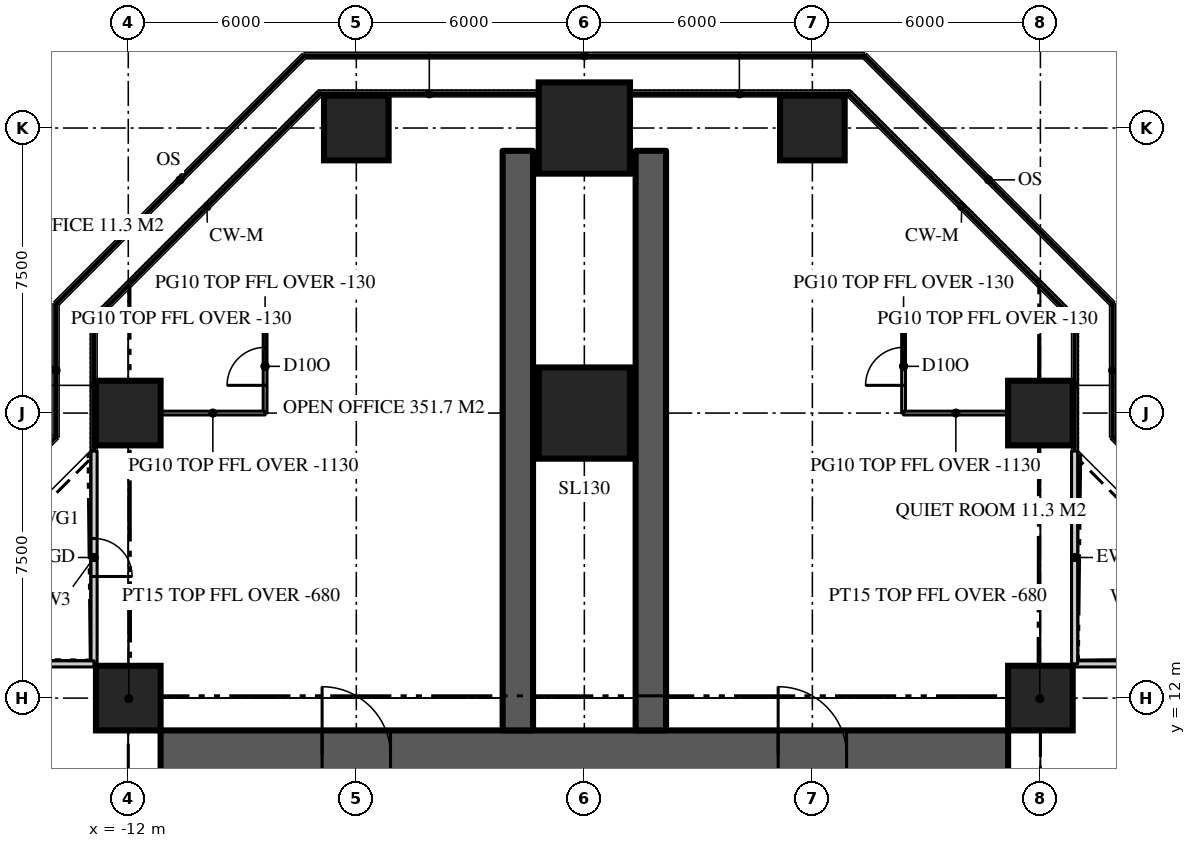
"""IFC4 building model, lengths in metres.
Left out: names, types, materials, properties, quantities, classifications, styles, units other than length and angle.
Written with IfcOpenShell. Run it as: python <this file> out.ifc"""

import sys

from ifc_helpers import new_model, si_unit, direction, frame, frame_2d, origin, origin_2d, place, context, subcontext, project, spatial, rectangle, extrude, element, fill, save


model = new_model("IFC4")
c1 = context("Model", 3, precision=1e-05, world=origin(), true_north=direction((0.0, 1.0)))
c2 = subcontext(c1, "Body", "Model", "MODEL_VIEW")
j1 = project(units=[si_unit("LENGTHUNIT", "METRE"), si_unit("PLANEANGLEUNIT", "RADIAN")], contexts=[c1])
p1 = place(None, origin())
s1 = spatial("IfcSite", under=j1, at=p1, CompositionType="ELEMENT")
p2 = place(p1, origin())
s2 = spatial("IfcBuilding", under=s1, at=p2, CompositionType="ELEMENT")
p3 = place(p2, frame((0.0, 0.0, 174.9)))
s3 = spatial("IfcBuildingStorey", under=s2, at=p3, CompositionType="ELEMENT", Elevation=174.9)
p4 = place(p3, frame((-11.15, 10.5, 0.0), z_axis=(0.0, 0.0, 1.0), x_axis=(1.0, 0.0, 0.0)))
e1 = element("IfcWall", 1, at=p4, inside=s3, PredefinedType="SHEAR", context=c2, shape_type="SweptSolid", body=[
    extrude(rectangle(XDim=22.3, YDim=1.3, at=frame_2d((11.15, 0.0))), origin(), (0.0, 0.0, 1.0), 3.9),
])
p5 = place(p4, frame((4.25, 0.0, 0.0)))
e2 = element("IfcOpeningElement", 2, at=p5, cuts=e1, PredefinedType="OPENING", context=c2, shape_type="SweptSolid", body=[
    extrude(rectangle(XDim=1.8, YDim=2.2, at=frame_2d((0.9, 1.1))), frame((0.0, 0.66, 0.0), z_axis=(0.0, -1.0, 0.0), x_axis=(1.0, 0.0, 0.0)), (0.0, 0.0, 1.0), 1.32),
])
p6 = place(p4, frame((16.25, 0.0, 0.0)))
e3 = element("IfcOpeningElement", 3, at=p6, cuts=e1, PredefinedType="OPENING", context=c2, shape_type="SweptSolid", body=[
    extrude(rectangle(XDim=1.8, YDim=2.2, at=frame_2d((0.9, 1.1))), frame((0.0, 0.66, 0.0), z_axis=(0.0, -1.0, 0.0), x_axis=(1.0, 0.0, 0.0)), (0.0, 0.0, 1.0), 1.32),
])
for number, where, z_axis, x_axis in (
    (4, (1.75, 11.15, 0.0), (0.0, 0.0, 1.0), (0.0, 1.0, 0.0)),
    (5, (-1.75, 11.15, 0.0), (0.0, 0.0, 1.0), (0.0, 1.0, 0.0)),
):
    element("IfcWall", number, at=place(p3, frame(where, z_axis=z_axis, x_axis=x_axis)), inside=s3, PredefinedType="SHEAR", context=c2, shape_type="SweptSolid", body=[
        extrude(rectangle(XDim=15.25, YDim=0.8, at=frame_2d((7.625, 0.0))), origin(), (0.0, 0.0, 1.0), 3.9),
    ])
for number, where, z_axis, x_axis in (
    (6, (-12.0, 12.0, 0.0), (0.0, 0.0, 1.0), (1.0, 0.0, 0.0)),
    (7, (12.0, 12.0, 0.0), (0.0, 0.0, 1.0), (1.0, 0.0, 0.0)),
    (8, (-12.0, 19.5, 0.0), (0.0, 0.0, 1.0), (1.0, 0.0, 0.0)),
):
    element("IfcColumn", number, at=place(p3, frame(where, z_axis=z_axis, x_axis=x_axis)), inside=s3, PredefinedType="COLUMN", context=c2, shape_type="SweptSolid", body=[
        extrude(rectangle(XDim=1.7, YDim=1.7, at=origin_2d()), origin(), (0.0, 0.0, 1.0), 3.9),
    ])
p7 = place(p3, frame((0.0, 19.5, 0.0), z_axis=(0.0, 0.0, 1.0), x_axis=(1.0, 0.0, 0.0)))
e9 = element("IfcColumn", 9, at=p7, inside=s3, PredefinedType="COLUMN", context=c2, shape_type="SweptSolid", body=[
    extrude(rectangle(XDim=2.4, YDim=2.4, at=origin_2d()), origin(), (0.0, 0.0, 1.0), 3.9),
])
for number, where, z_axis, x_axis in (
    (10, (12.0, 19.5, 0.0), (0.0, 0.0, 1.0), (1.0, 0.0, 0.0)),
    (11, (-6.0, 27.0, 0.0), (0.0, 0.0, 1.0), (1.0, 0.0, 0.0)),
):
    element("IfcColumn", number, at=place(p3, frame(where, z_axis=z_axis, x_axis=x_axis)), inside=s3, PredefinedType="COLUMN", context=c2, shape_type="SweptSolid", body=[
        extrude(rectangle(XDim=1.7, YDim=1.7, at=origin_2d()), origin(), (0.0, 0.0, 1.0), 3.9),
    ])
p8 = place(p3, frame((0.0, 27.0, 0.0), z_axis=(0.0, 0.0, 1.0), x_axis=(1.0, 0.0, 0.0)))
e12 = element("IfcColumn", 12, at=p8, inside=s3, PredefinedType="COLUMN", context=c2, shape_type="SweptSolid", body=[
    extrude(rectangle(XDim=2.4, YDim=2.4, at=origin_2d()), origin(), (0.0, 0.0, 1.0), 3.9),
])
p9 = place(p3, frame((6.0, 27.0, 0.0), z_axis=(0.0, 0.0, 1.0), x_axis=(1.0, 0.0, 0.0)))
e13 = element("IfcColumn", 13, at=p9, inside=s3, PredefinedType="COLUMN", context=c2, shape_type="SweptSolid", body=[
    extrude(rectangle(XDim=1.7, YDim=1.7, at=origin_2d()), origin(), (0.0, 0.0, 1.0), 3.9),
])
p10 = place(p3, frame((18.5, 12.9, 0.0), z_axis=(0.0, 0.0, 1.0), x_axis=(-1.0, 0.0, 0.0)))
e14 = element("IfcWall", 14, at=p10, inside=s3, PredefinedType="SOLIDWALL", context=c2, shape_type="SweptSolid", body=[
    extrude(rectangle(XDim=5.6, YDim=0.16, at=frame_2d((2.8, 0.0))), origin(), (0.0, 0.0, 1.0), 3.77),
])
p11 = place(p10, frame((2.3, 0.0, 0.0)))
e15 = element("IfcOpeningElement", 15, at=p11, cuts=e14, PredefinedType="OPENING", context=c2, shape_type="SweptSolid", body=[
    extrude(rectangle(XDim=1.0, YDim=2.2, at=frame_2d((0.5, 1.1))), frame((0.0, 0.09, 0.0), z_axis=(0.0, -1.0, 0.0), x_axis=(1.0, 0.0, 0.0)), (0.0, 0.0, 1.0), 0.18),
])
p12 = place(p3, frame((12.9, 12.9, 0.0), z_axis=(0.0, 0.0, 1.0), x_axis=(0.0, 1.0, 0.0)))
e16 = element("IfcWall", 16, at=p12, inside=s3, PredefinedType="SOLIDWALL", context=c2, shape_type="SweptSolid", body=[
    extrude(rectangle(XDim=5.6, YDim=0.16, at=frame_2d((2.8, 0.0))), origin(), (0.0, 0.0, 1.0), 3.77),
])
p13 = place(p3, frame((-12.9, 18.5, 0.0), z_axis=(0.0, 0.0, 1.0), x_axis=(0.0, -1.0, 0.0)))
e17 = element("IfcWall", 17, at=p13, inside=s3, PredefinedType="SOLIDWALL", context=c2, shape_type="SweptSolid", body=[
    extrude(rectangle(XDim=5.6, YDim=0.16, at=frame_2d((2.8, 0.0))), origin(), (0.0, 0.0, 1.0), 3.77),
])
p14 = place(p13, frame((2.3, 0.0, 0.0)))
e18 = element("IfcOpeningElement", 18, at=p14, cuts=e17, PredefinedType="OPENING", context=c2, shape_type="SweptSolid", body=[
    extrude(rectangle(XDim=1.0, YDim=2.2, at=frame_2d((0.5, 1.1))), frame((0.0, 0.09, 0.0), z_axis=(0.0, -1.0, 0.0), x_axis=(1.0, 0.0, 0.0)), (0.0, 0.0, 1.0), 0.18),
])
p15 = place(p3, frame((-12.9, 12.9, 0.0), z_axis=(0.0, 0.0, 1.0), x_axis=(-1.0, 0.0, 0.0)))
e19 = element("IfcWall", 19, at=p15, inside=s3, PredefinedType="SOLIDWALL", context=c2, shape_type="SweptSolid", body=[
    extrude(rectangle(XDim=5.6, YDim=0.16, at=frame_2d((2.8, 0.0))), origin(), (0.0, 0.0, 1.0), 3.77),
])
p16 = place(p3, frame((-8.4, 19.5, 0.0), z_axis=(0.0, 0.0, 1.0), x_axis=(0.0, 1.0, 0.0)))
e20 = element("IfcWall", 20, at=p16, inside=s3, PredefinedType="PARTITIONING", context=c2, shape_type="SweptSolid", body=[
    extrude(rectangle(XDim=2.459, YDim=0.1, at=frame_2d((1.229, 0.0))), origin(), (0.0, 0.0, 1.0), 3.77),
])
p17 = place(p16, frame((0.729, 0.0, 0.0)))
e21 = element("IfcOpeningElement", 21, at=p17, cuts=e20, PredefinedType="OPENING", context=c2, shape_type="SweptSolid", body=[
    extrude(rectangle(XDim=1.0, YDim=2.2, at=frame_2d((0.5, 1.1))), frame((0.0, 0.06, 0.0), z_axis=(0.0, -1.0, 0.0), x_axis=(1.0, 0.0, 0.0)), (0.0, 0.0, 1.0), 0.12),
])
p18 = place(p3, frame((-8.4, 19.5, 0.0), z_axis=(0.0, 0.0, 1.0), x_axis=(-1.0, 0.0, 0.0)))
e22 = element("IfcWall", 22, at=p18, inside=s3, PredefinedType="PARTITIONING", context=c2, shape_type="SweptSolid", body=[
    extrude(rectangle(XDim=2.75, YDim=0.1, at=frame_2d((1.375, 0.0))), origin(), (0.0, 0.0, 1.0), 2.77),
])
p19 = place(p3, frame((-8.4, 21.959, 0.0), z_axis=(0.0, 0.0, 1.0), x_axis=(-1.0, 0.0, 0.0)))
e23 = element("IfcWall", 23, at=p19, inside=s3, PredefinedType="PARTITIONING", context=c2, shape_type="SweptSolid", body=[
    extrude(rectangle(XDim=4.42, YDim=0.1, at=frame_2d((2.21, 0.0))), origin(), (0.0, 0.0, 1.0), 3.77),
])
p20 = place(p3, frame((8.4, 19.5, 0.0), z_axis=(0.0, 0.0, 1.0), x_axis=(0.0, 1.0, 0.0)))
e24 = element("IfcWall", 24, at=p20, inside=s3, PredefinedType="PARTITIONING", context=c2, shape_type="SweptSolid", body=[
    extrude(rectangle(XDim=2.459, YDim=0.1, at=frame_2d((1.229, 0.0))), origin(), (0.0, 0.0, 1.0), 3.77),
])
p21 = place(p20, frame((0.729, 0.0, 0.0)))
e25 = element("IfcOpeningElement", 25, at=p21, cuts=e24, PredefinedType="OPENING", context=c2, shape_type="SweptSolid", body=[
    extrude(rectangle(XDim=1.0, YDim=2.2, at=frame_2d((0.5, 1.1))), frame((0.0, 0.06, 0.0), z_axis=(0.0, -1.0, 0.0), x_axis=(1.0, 0.0, 0.0)), (0.0, 0.0, 1.0), 0.12),
])
p22 = place(p3, frame((8.4, 19.5, 0.0), z_axis=(0.0, 0.0, 1.0), x_axis=(1.0, 0.0, 0.0)))
e26 = element("IfcWall", 26, at=p22, inside=s3, PredefinedType="PARTITIONING", context=c2, shape_type="SweptSolid", body=[
    extrude(rectangle(XDim=2.75, YDim=0.1, at=frame_2d((1.375, 0.0))), origin(), (0.0, 0.0, 1.0), 2.77),
])
p23 = place(p3, frame((8.4, 21.959, 0.0), z_axis=(0.0, 0.0, 1.0), x_axis=(1.0, 0.0, 0.0)))
e27 = element("IfcWall", 27, at=p23, inside=s3, PredefinedType="PARTITIONING", context=c2, shape_type="SweptSolid", body=[
    extrude(rectangle(XDim=4.42, YDim=0.1, at=frame_2d((2.21, 0.0))), origin(), (0.0, 0.0, 1.0), 3.77),
])
for number, where, z_axis, x_axis in (
    (28, (11.15, 11.15, 0.0), (0.0, 0.0, 1.0), (0.707, 0.707, 0.0)),
    (29, (-11.15, 11.15, 0.0), (0.0, 0.0, 1.0), (-0.707, 0.707, 0.0)),
):
    element("IfcWall", number, at=place(p3, frame(where, z_axis=z_axis, x_axis=x_axis)), inside=s3, PredefinedType="PARTITIONING", context=c2, shape_type="SweptSolid", body=[
        extrude(rectangle(XDim=2.362, YDim=0.15, at=frame_2d((1.181, 0.0))), origin(), (0.0, 0.0, 1.0), 3.22),
    ])
p24 = place(p14, origin())
e30 = element("IfcDoor", 30, at=p24, inside=s3, OperationType="SINGLE_SWING_RIGHT", PredefinedType="DOOR", context=c2, shape_type="SweptSolid", body=[
    extrude(rectangle(XDim=1.0, YDim=2.2, at=frame_2d((0.5, 1.1))), frame((0.0, 0.025, 0.0), z_axis=(0.0, -1.0, 0.0), x_axis=(1.0, 0.0, 0.0)), (0.0, 0.0, 1.0), 0.05),
])
fill(e18, e30)
p25 = place(p5, origin())
e31 = element("IfcDoor", 31, at=p25, inside=s3, OperationType="DOUBLE_DOOR_DOUBLE_SWING", PredefinedType="DOOR", context=c2, shape_type="SweptSolid", body=[
    extrude(rectangle(XDim=1.8, YDim=2.2, at=frame_2d((0.9, 1.1))), frame((0.0, 0.025, 0.0), z_axis=(0.0, -1.0, 0.0), x_axis=(1.0, 0.0, 0.0)), (0.0, 0.0, 1.0), 0.05),
])
fill(e2, e31)
p26 = place(p6, origin())
e32 = element("IfcDoor", 32, at=p26, inside=s3, OperationType="DOUBLE_DOOR_DOUBLE_SWING", PredefinedType="DOOR", context=c2, shape_type="SweptSolid", body=[
    extrude(rectangle(XDim=1.8, YDim=2.2, at=frame_2d((0.9, 1.1))), frame((0.0, 0.025, 0.0), z_axis=(0.0, -1.0, 0.0), x_axis=(1.0, 0.0, 0.0)), (0.0, 0.0, 1.0), 0.05),
])
fill(e3, e32)
p27 = place(p17, origin())
e33 = element("IfcDoor", 33, at=p27, inside=s3, OperationType="SINGLE_SWING_LEFT", PredefinedType="DOOR", context=c2, shape_type="SweptSolid", body=[
    extrude(rectangle(XDim=1.0, YDim=2.2, at=frame_2d((0.5, 1.1))), frame((0.0, 0.025, 0.0), z_axis=(0.0, -1.0, 0.0), x_axis=(1.0, 0.0, 0.0)), (0.0, 0.0, 1.0), 0.05),
])
fill(e21, e33)
p28 = place(p21, origin())
e34 = element("IfcDoor", 34, at=p28, inside=s3, OperationType="SINGLE_SWING_LEFT", PredefinedType="DOOR", context=c2, shape_type="SweptSolid", body=[
    extrude(rectangle(XDim=1.0, YDim=2.2, at=frame_2d((0.5, 1.1))), frame((0.0, 0.025, 0.0), z_axis=(0.0, -1.0, 0.0), x_axis=(1.0, 0.0, 0.0)), (0.0, 0.0, 1.0), 0.05),
])
fill(e25, e34)
save(model, sys.argv[1])
